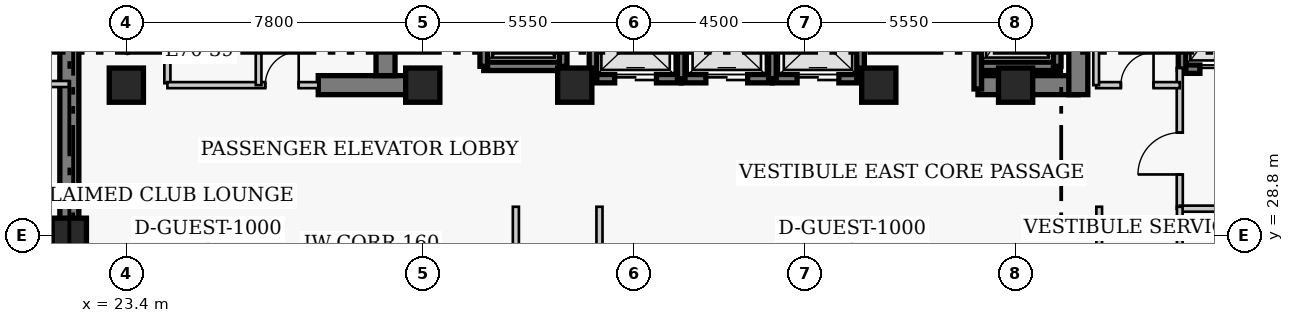
"""IFC4 building model, lengths in metres.
Left out: names, types, materials, properties, quantities, classifications, styles, units other than length and angle.
Written with IfcOpenShell. Run it as: python <this file> out.ifc"""

import sys

from ifc_helpers import new_model, si_unit, direction, frame, frame_2d, origin, origin_2d, place, context, subcontext, project, spatial, rectangle, extrude, element, fill, save


model = new_model("IFC4")
c1 = context("Model", 3, precision=1e-05, world=origin(), true_north=direction((0.0, 1.0)))
c2 = subcontext(c1, "Body", "Model", "MODEL_VIEW")
j1 = project(units=[si_unit("LENGTHUNIT", "METRE"), si_unit("PLANEANGLEUNIT", "RADIAN")], contexts=[c1])
p1 = place(None, origin())
s1 = spatial("IfcSite", under=j1, at=p1, CompositionType="ELEMENT")
p2 = place(p1, origin())
s2 = spatial("IfcBuilding", under=s1, at=p2, CompositionType="ELEMENT")
p3 = place(p2, frame((0.0, 0.0, 281.4)))
s3 = spatial("IfcBuildingStorey", under=s2, at=p3, CompositionType="ELEMENT", Elevation=281.4)
p4 = place(p3, frame((21.9, 27.05, 0.0), z_axis=(0.0, 0.0, 1.0), x_axis=(0.0, 1.0, 0.0)))
e1 = element("IfcWall", 1, at=p4, inside=s3, PredefinedType="SHEAR", context=c2, shape_type="SweptSolid", body=[
    extrude(rectangle(XDim=13.52, YDim=0.5, at=frame_2d((6.76, 0.0))), origin(), (0.0, 0.0, 1.0), 4.0),
])
p5 = place(p3, frame((28.45, 32.75, 0.0), z_axis=(0.0, 0.0, 1.0), x_axis=(1.0, 0.0, 0.0)))
e2 = element("IfcWall", 2, at=p5, inside=s3, PredefinedType="SHEAR", context=c2, shape_type="SweptSolid", body=[
    extrude(rectangle(XDim=2.4, YDim=0.5, at=frame_2d((1.2, 0.0))), origin(), (0.0, 0.0, 1.0), 4.0),
])
p6 = place(p3, frame((45.81, 32.75, 0.0), z_axis=(0.0, 0.0, 1.0), x_axis=(1.0, 0.0, 0.0)))
e3 = element("IfcWall", 3, at=p6, inside=s3, PredefinedType="SHEAR", context=c2, shape_type="SweptSolid", body=[
    extrude(rectangle(XDim=2.64, YDim=0.5, at=frame_2d((1.32, 0.0))), origin(), (0.0, 0.0, 1.0), 4.0),
])
p7 = place(p3, frame((30.22, 33.0, 0.0), z_axis=(0.0, 0.0, 1.0), x_axis=(0.0, 1.0, 0.0)))
e4 = element("IfcWall", 4, at=p7, inside=s3, PredefinedType="SHEAR", context=c2, shape_type="SweptSolid", body=[
    extrude(rectangle(XDim=7.32, YDim=0.5, at=frame_2d((3.66, 0.0))), origin(), (0.0, 0.0, 1.0), 4.0),
])
p8 = place(p3, frame((48.45, 32.5, 0.0), z_axis=(0.0, 0.0, 1.0), x_axis=(0.0, 1.0, 0.0)))
e5 = element("IfcWall", 5, at=p8, inside=s3, PredefinedType="SHEAR", context=c2, shape_type="SweptSolid", body=[
    extrude(rectangle(XDim=7.82, YDim=0.5, at=frame_2d((3.91, 0.0))), origin(), (0.0, 0.0, 1.0), 4.0),
])
p9 = place(p8, frame((5.7, 0.0, 0.0)))
e6 = element("IfcOpeningElement", 6, at=p9, cuts=e5, PredefinedType="OPENING", context=c2, shape_type="SweptSolid", body=[
    extrude(rectangle(XDim=1.1, YDim=2.15, at=frame_2d((0.55, 1.075))), frame((0.0, 0.26, 0.0), z_axis=(0.0, -1.0, 0.0), x_axis=(1.0, 0.0, 0.0)), (0.0, 0.0, 1.0), 0.52),
])
for number, where, z_axis, x_axis in (
    (7, (21.9, 28.8, 0.0), (0.0, 0.0, 1.0), (1.0, 0.0, 0.0)),
    (8, (23.4, 32.75, 0.0), (0.0, 0.0, 1.0), (1.0, 0.0, 0.0)),
    (9, (31.2, 32.75, 0.0), (0.0, 0.0, 1.0), (1.0, 0.0, 0.0)),
    (10, (35.2, 32.75, 0.0), (0.0, 0.0, 1.0), (1.0, 0.0, 0.0)),
    (11, (43.2, 32.75, 0.0), (0.0, 0.0, 1.0), (1.0, 0.0, 0.0)),
    (12, (46.8, 32.75, 0.0), (0.0, 0.0, 1.0), (1.0, 0.0, 0.0)),
):
    element("IfcColumn", number, at=place(p3, frame(where, z_axis=z_axis, x_axis=x_axis)), inside=s3, PredefinedType="COLUMN", context=c2, shape_type="SweptSolid", body=[
        extrude(rectangle(XDim=0.9, YDim=0.9, at=origin_2d()), origin(), (0.0, 0.0, 1.0), 4.0),
    ])
p10 = place(p3, frame((35.68, 32.92, 0.0), z_axis=(0.0, 0.0, 1.0), x_axis=(1.0, 0.0, 0.0)))
e13 = element("IfcWall", 13, at=p10, inside=s3, PredefinedType="SHEAR", context=c2, shape_type="SweptSolid", body=[
    extrude(rectangle(XDim=2.32, YDim=0.22, at=frame_2d((1.16, 0.0))), origin(), (0.0, 0.0, 1.0), 4.0),
])
p11 = place(p10, frame((0.57, 0.0, 0.0)))
e14 = element("IfcOpeningElement", 14, at=p11, cuts=e13, PredefinedType="OPENING", context=c2, shape_type="SweptSolid", body=[
    extrude(rectangle(XDim=1.1, YDim=2.15, at=frame_2d((0.55, 1.075))), frame((0.0, 0.12, 0.0), z_axis=(0.0, -1.0, 0.0), x_axis=(1.0, 0.0, 0.0)), (0.0, 0.0, 1.0), 0.24),
])
p12 = place(p3, frame((35.68, 32.92, 0.0), z_axis=(0.0, 0.0, 1.0), x_axis=(0.0, 1.0, 0.0)))
e15 = element("IfcWall", 15, at=p12, inside=s3, PredefinedType="SHEAR", context=c2, shape_type="SweptSolid", body=[
    extrude(rectangle(XDim=2.16, YDim=0.2, at=frame_2d((1.08, 0.0))), origin(), (0.0, 0.0, 1.0), 4.0),
])
p13 = place(p3, frame((38.0, 32.92, 0.0), z_axis=(0.0, 0.0, 1.0), x_axis=(1.0, 0.0, 0.0)))
e16 = element("IfcWall", 16, at=p13, inside=s3, PredefinedType="SHEAR", context=c2, shape_type="SweptSolid", body=[
    extrude(rectangle(XDim=2.4, YDim=0.22, at=frame_2d((1.2, 0.0))), origin(), (0.0, 0.0, 1.0), 4.0),
])
p14 = place(p13, frame((0.65, 0.0, 0.0)))
e17 = element("IfcOpeningElement", 17, at=p14, cuts=e16, PredefinedType="OPENING", context=c2, shape_type="SweptSolid", body=[
    extrude(rectangle(XDim=1.1, YDim=2.15, at=frame_2d((0.55, 1.075))), frame((0.0, 0.12, 0.0), z_axis=(0.0, -1.0, 0.0), x_axis=(1.0, 0.0, 0.0)), (0.0, 0.0, 1.0), 0.24),
])
p15 = place(p3, frame((38.0, 32.92, 0.0), z_axis=(0.0, 0.0, 1.0), x_axis=(0.0, 1.0, 0.0)))
e18 = element("IfcWall", 18, at=p15, inside=s3, PredefinedType="SHEAR", context=c2, shape_type="SweptSolid", body=[
    extrude(rectangle(XDim=2.16, YDim=0.2, at=frame_2d((1.08, 0.0))), origin(), (0.0, 0.0, 1.0), 4.0),
])
p16 = place(p3, frame((40.4, 32.92, 0.0), z_axis=(0.0, 0.0, 1.0), x_axis=(1.0, 0.0, 0.0)))
e19 = element("IfcWall", 19, at=p16, inside=s3, PredefinedType="SHEAR", context=c2, shape_type="SweptSolid", body=[
    extrude(rectangle(XDim=2.32, YDim=0.22, at=frame_2d((1.16, 0.0))), origin(), (0.0, 0.0, 1.0), 4.0),
])
p17 = place(p16, frame((0.65, 0.0, 0.0)))
e20 = element("IfcOpeningElement", 20, at=p17, cuts=e19, PredefinedType="OPENING", context=c2, shape_type="SweptSolid", body=[
    extrude(rectangle(XDim=1.1, YDim=2.15, at=frame_2d((0.55, 1.075))), frame((0.0, 0.12, 0.0), z_axis=(0.0, -1.0, 0.0), x_axis=(1.0, 0.0, 0.0)), (0.0, 0.0, 1.0), 0.24),
])
for number, where, z_axis, x_axis in (
    (21, (40.4, 32.92, 0.0), (0.0, 0.0, 1.0), (0.0, 1.0, 0.0)),
    (22, (42.72, 32.92, 0.0), (0.0, 0.0, 1.0), (0.0, 1.0, 0.0)),
):
    element("IfcWall", number, at=place(p3, frame(where, z_axis=z_axis, x_axis=x_axis)), inside=s3, PredefinedType="SHEAR", context=c2, shape_type="SweptSolid", body=[
        extrude(rectangle(XDim=2.16, YDim=0.2, at=frame_2d((1.08, 0.0))), origin(), (0.0, 0.0, 1.0), 4.0),
    ])
p18 = place(p3, frame((51.18, 33.17, 0.0), z_axis=(0.0, 0.0, 1.0), x_axis=(1.0, 0.0, 0.0)))
e23 = element("IfcWall", 23, at=p18, inside=s3, PredefinedType="SHEAR", context=c2, shape_type="SweptSolid", body=[
    extrude(rectangle(XDim=2.42, YDim=0.22, at=frame_2d((1.21, 0.0))), origin(), (0.0, 0.0, 1.0), 4.0),
])
p19 = place(p18, frame((0.47, 0.0, 0.0)))
e24 = element("IfcOpeningElement", 24, at=p19, cuts=e23, PredefinedType="OPENING", context=c2, shape_type="SweptSolid", body=[
    extrude(rectangle(XDim=1.3, YDim=2.15, at=frame_2d((0.65, 1.075))), frame((0.0, 0.12, 0.0), z_axis=(0.0, -1.0, 0.0), x_axis=(1.0, 0.0, 0.0)), (0.0, 0.0, 1.0), 0.24),
])
p20 = place(p3, frame((51.18, 33.17, 0.0), z_axis=(0.0, 0.0, 1.0), x_axis=(0.0, 1.0, 0.0)))
e25 = element("IfcWall", 25, at=p20, inside=s3, PredefinedType="SHEAR", context=c2, shape_type="SweptSolid", body=[
    extrude(rectangle(XDim=2.86, YDim=0.2, at=frame_2d((1.43, 0.0))), origin(), (0.0, 0.0, 1.0), 4.0),
])
p21 = place(p3, frame((32.805, 33.245, 0.0), z_axis=(0.0, 0.0, 1.0), x_axis=(1.0, 0.0, 0.0)))
e26 = element("IfcWall", 26, at=p21, inside=s3, PredefinedType="SHEAR", context=c2, shape_type="SweptSolid", body=[
    extrude(rectangle(XDim=2.09, YDim=0.22, at=frame_2d((1.045, 0.0))), origin(), (0.0, 0.0, 1.0), 4.0),
])
for number, where, z_axis, x_axis in (
    (27, (32.805, 33.245, 0.0), (0.0, 0.0, 1.0), (0.0, 1.0, 0.0)),
    (28, (34.895, 33.245, 0.0), (0.0, 0.0, 1.0), (0.0, 1.0, 0.0)),
):
    element("IfcWall", number, at=place(p3, frame(where, z_axis=z_axis, x_axis=x_axis)), inside=s3, PredefinedType="SHEAR", context=c2, shape_type="SweptSolid", body=[
        extrude(rectangle(XDim=2.91, YDim=0.2, at=frame_2d((1.455, 0.0))), origin(), (0.0, 0.0, 1.0), 4.0),
    ])
p22 = place(p3, frame((45.805, 33.245, 0.0), z_axis=(0.0, 0.0, 1.0), x_axis=(1.0, 0.0, 0.0)))
e29 = element("IfcWall", 29, at=p22, inside=s3, PredefinedType="SHEAR", context=c2, shape_type="SweptSolid", body=[
    extrude(rectangle(XDim=2.09, YDim=0.22, at=frame_2d((1.045, 0.0))), origin(), (0.0, 0.0, 1.0), 4.0),
])
p23 = place(p3, frame((45.805, 32.65, 0.0), z_axis=(0.0, 0.0, 1.0), x_axis=(0.0, 1.0, 0.0)))
e30 = element("IfcWall", 30, at=p23, inside=s3, PredefinedType="SHEAR", context=c2, shape_type="SweptSolid", body=[
    extrude(rectangle(XDim=3.505, YDim=0.2, at=frame_2d((1.752, 0.0))), origin(), (0.0, 0.0, 1.0), 4.0),
])
p24 = place(p3, frame((47.895, 33.245, 0.0), z_axis=(0.0, 0.0, 1.0), x_axis=(0.0, 1.0, 0.0)))
e31 = element("IfcWall", 31, at=p24, inside=s3, PredefinedType="SHEAR", context=c2, shape_type="SweptSolid", body=[
    extrude(rectangle(XDim=2.91, YDim=0.2, at=frame_2d((1.455, 0.0))), origin(), (0.0, 0.0, 1.0), 4.0),
])
p25 = place(p3, frame((24.48, 32.8, 0.0), z_axis=(0.0, 0.0, 1.0), x_axis=(0.0, 1.0, 0.0)))
e32 = element("IfcWall", 32, at=p25, inside=s3, PredefinedType="PARTITIONING", context=c2, shape_type="SweptSolid", body=[
    extrude(rectangle(XDim=3.57, YDim=0.16, at=frame_2d((1.785, 0.0))), origin(), (0.0, 0.0, 1.0), 3.76),
])
p26 = place(p25, frame((1.604, 0.0, 0.0)))
e33 = element("IfcOpeningElement", 33, at=p26, cuts=e32, PredefinedType="OPENING", context=c2, shape_type="SweptSolid", body=[
    extrude(rectangle(XDim=0.9, YDim=2.1, at=frame_2d((0.45, 1.05))), frame((0.0, 0.09, 0.0), z_axis=(0.0, -1.0, 0.0), x_axis=(1.0, 0.0, 0.0)), (0.0, 0.0, 1.0), 0.18),
])
p27 = place(p3, frame((51.12, 29.5, 0.0), z_axis=(0.0, 0.0, 1.0), x_axis=(0.0, 1.0, 0.0)))
e34 = element("IfcWall", 34, at=p27, inside=s3, PredefinedType="PARTITIONING", context=c2, shape_type="SweptSolid", body=[
    extrude(rectangle(XDim=3.7, YDim=0.16, at=frame_2d((1.85, 0.0))), origin(), (0.0, 0.0, 1.0), 3.76),
])
p28 = place(p27, frame((0.9, 0.0, 0.0)))
e35 = element("IfcOpeningElement", 35, at=p28, cuts=e34, PredefinedType="OPENING", context=c2, shape_type="SweptSolid", body=[
    extrude(rectangle(XDim=1.1, YDim=2.15, at=frame_2d((0.55, 1.075))), frame((0.0, 0.09, 0.0), z_axis=(0.0, -1.0, 0.0), x_axis=(1.0, 0.0, 0.0)), (0.0, 0.0, 1.0), 0.18),
])
p29 = place(p3, frame((51.12, 29.5, 0.0), z_axis=(0.0, 0.0, 1.0), x_axis=(1.0, 0.0, 0.0)))
e36 = element("IfcWall", 36, at=p29, inside=s3, PredefinedType="PARTITIONING", context=c2, shape_type="SweptSolid", body=[
    extrude(rectangle(XDim=5.63, YDim=0.16, at=frame_2d((2.815, 0.0))), origin(), (0.0, 0.0, 1.0), 3.76),
])
p30 = place(p3, frame((24.48, 32.75, 0.0), z_axis=(0.0, 0.0, 1.0), x_axis=(1.0, 0.0, 0.0)))
e37 = element("IfcWall", 37, at=p30, inside=s3, PredefinedType="PARTITIONING", context=c2, shape_type="SweptSolid", body=[
    extrude(rectangle(XDim=3.97, YDim=0.16, at=frame_2d((1.985, 0.0))), origin(), (0.0, 0.0, 1.0), 3.76),
])
p31 = place(p30, frame((2.575, 0.0, 0.0)))
e38 = element("IfcOpeningElement", 38, at=p31, cuts=e37, PredefinedType="OPENING", context=c2, shape_type="SweptSolid", body=[
    extrude(rectangle(XDim=0.88, YDim=2.05, at=frame_2d((0.44, 1.025))), frame((0.0, 0.09, 0.0), z_axis=(0.0, -1.0, 0.0), x_axis=(1.0, 0.0, 0.0)), (0.0, 0.0, 1.0), 0.18),
])
p32 = place(p3, frame((48.92, 32.75, 0.0), z_axis=(0.0, 0.0, 1.0), x_axis=(1.0, 0.0, 0.0)))
e39 = element("IfcWall", 39, at=p32, inside=s3, PredefinedType="PARTITIONING", context=c2, shape_type="SweptSolid", body=[
    extrude(rectangle(XDim=2.2, YDim=0.16, at=frame_2d((1.1, 0.0))), origin(), (0.0, 0.0, 1.0), 3.76),
])
p33 = place(p32, frame((0.65, 0.0, 0.0)))
e40 = element("IfcOpeningElement", 40, at=p33, cuts=e39, PredefinedType="OPENING", context=c2, shape_type="SweptSolid", body=[
    extrude(rectangle(XDim=0.86, YDim=2.05, at=frame_2d((0.43, 1.025))), frame((0.0, 0.09, 0.0), z_axis=(0.0, -1.0, 0.0), x_axis=(1.0, 0.0, 0.0)), (0.0, 0.0, 1.0), 0.18),
])
for number, where, z_axis, x_axis in (
    (41, (48.92, 32.75, 0.0), (0.0, 0.0, 1.0), (0.0, 1.0, 0.0)),
    (42, (26.88, 32.75, 0.0), (0.0, 0.0, 1.0), (0.0, 1.0, 0.0)),
):
    element("IfcWall", number, at=place(p3, frame(where, z_axis=z_axis, x_axis=x_axis)), inside=s3, PredefinedType="PARTITIONING", context=c2, shape_type="SweptSolid", body=[
        extrude(rectangle(XDim=3.62, YDim=0.15, at=frame_2d((1.81, 0.0))), origin(), (0.0, 0.0, 1.0), 3.76),
    ])
for number, where, z_axis, x_axis in (
    (43, (33.65, 27.06, 0.0), (0.0, 0.0, 1.0), (0.0, 1.0, 0.0)),
    (44, (35.85, 27.06, 0.0), (0.0, 0.0, 1.0), (0.0, 1.0, 0.0)),
):
    element("IfcWall", number, at=place(p3, frame(where, z_axis=z_axis, x_axis=x_axis)), inside=s3, PredefinedType="PARTITIONING", context=c2, shape_type="SweptSolid", body=[
        extrude(rectangle(XDim=2.49, YDim=0.16, at=frame_2d((1.245, 0.0))), origin(), (0.0, 0.0, 1.0), 3.76),
    ])
p34 = place(p3, frame((18.86, 32.78, 0.0), z_axis=(0.0, 0.0, 1.0), x_axis=(1.0, 0.0, 0.0)))
e45 = element("IfcWall", 45, at=p34, inside=s3, PredefinedType="PARTITIONING", context=c2, shape_type="SweptSolid", body=[
    extrude(rectangle(XDim=3.04, YDim=0.16, at=frame_2d((1.52, 0.0))), origin(), (0.0, 0.0, 1.0), 3.76),
])
for number, where, z_axis, x_axis in (
    (46, (49.0, 27.06, 0.0), (0.0, 0.0, 1.0), (0.0, 1.0, 0.0)),
    (47, (51.12, 27.06, 0.0), (0.0, 0.0, 1.0), (0.0, 1.0, 0.0)),
):
    element("IfcWall", number, at=place(p3, frame(where, z_axis=z_axis, x_axis=x_axis)), inside=s3, PredefinedType="PARTITIONING", context=c2, shape_type="SweptSolid", body=[
        extrude(rectangle(XDim=2.49, YDim=0.15, at=frame_2d((1.245, 0.0))), origin(), (0.0, 0.0, 1.0), 3.76),
    ])
p35 = place(p11, origin())
e48 = element("IfcDoor", 48, at=p35, inside=s3, OperationType="DOUBLE_DOOR_SLIDING", PredefinedType="DOOR", context=c2, shape_type="SweptSolid", body=[
    extrude(rectangle(XDim=1.1, YDim=2.15, at=frame_2d((0.55, 1.075))), frame((0.0, 0.025, 0.0), z_axis=(0.0, -1.0, 0.0), x_axis=(1.0, 0.0, 0.0)), (0.0, 0.0, 1.0), 0.05),
])
fill(e14, e48)
p36 = place(p14, origin())
e49 = element("IfcDoor", 49, at=p36, inside=s3, OperationType="DOUBLE_DOOR_SLIDING", PredefinedType="DOOR", context=c2, shape_type="SweptSolid", body=[
    extrude(rectangle(XDim=1.1, YDim=2.15, at=frame_2d((0.55, 1.075))), frame((0.0, 0.025, 0.0), z_axis=(0.0, -1.0, 0.0), x_axis=(1.0, 0.0, 0.0)), (0.0, 0.0, 1.0), 0.05),
])
fill(e17, e49)
p37 = place(p17, origin())
e50 = element("IfcDoor", 50, at=p37, inside=s3, OperationType="DOUBLE_DOOR_SLIDING", PredefinedType="DOOR", context=c2, shape_type="SweptSolid", body=[
    extrude(rectangle(XDim=1.1, YDim=2.15, at=frame_2d((0.55, 1.075))), frame((0.0, 0.025, 0.0), z_axis=(0.0, -1.0, 0.0), x_axis=(1.0, 0.0, 0.0)), (0.0, 0.0, 1.0), 0.05),
])
fill(e20, e50)
p38 = place(p19, origin())
e51 = element("IfcDoor", 51, at=p38, inside=s3, OperationType="DOUBLE_DOOR_SLIDING", PredefinedType="DOOR", context=c2, shape_type="SweptSolid", body=[
    extrude(rectangle(XDim=1.3, YDim=2.15, at=frame_2d((0.65, 1.075))), frame((0.0, 0.025, 0.0), z_axis=(0.0, -1.0, 0.0), x_axis=(1.0, 0.0, 0.0)), (0.0, 0.0, 1.0), 0.05),
])
fill(e24, e51)
p39 = place(p28, origin())
e52 = element("IfcDoor", 52, at=p39, inside=s3, OperationType="SINGLE_SWING_LEFT", PredefinedType="DOOR", context=c2, shape_type="SweptSolid", body=[
    extrude(rectangle(XDim=1.1, YDim=2.15, at=frame_2d((0.55, 1.075))), frame((0.0, 0.025, 0.0), z_axis=(0.0, -1.0, 0.0), x_axis=(1.0, 0.0, 0.0)), (0.0, 0.0, 1.0), 0.05),
])
fill(e35, e52)
p40 = place(p31, origin())
e53 = element("IfcDoor", 53, at=p40, inside=s3, OperationType="SINGLE_SWING_RIGHT", PredefinedType="DOOR", context=c2, shape_type="SweptSolid", body=[
    extrude(rectangle(XDim=0.88, YDim=2.05, at=frame_2d((0.44, 1.025))), frame((0.0, 0.025, 0.0), z_axis=(0.0, -1.0, 0.0), x_axis=(1.0, 0.0, 0.0)), (0.0, 0.0, 1.0), 0.05),
])
fill(e38, e53)
p41 = place(p33, origin())
e54 = element("IfcDoor", 54, at=p41, inside=s3, OperationType="SINGLE_SWING_RIGHT", PredefinedType="DOOR", context=c2, shape_type="SweptSolid", body=[
    extrude(rectangle(XDim=0.86, YDim=2.05, at=frame_2d((0.43, 1.025))), frame((0.0, 0.025, 0.0), z_axis=(0.0, -1.0, 0.0), x_axis=(1.0, 0.0, 0.0)), (0.0, 0.0, 1.0), 0.05),
])
fill(e40, e54)
save(model, sys.argv[1])
